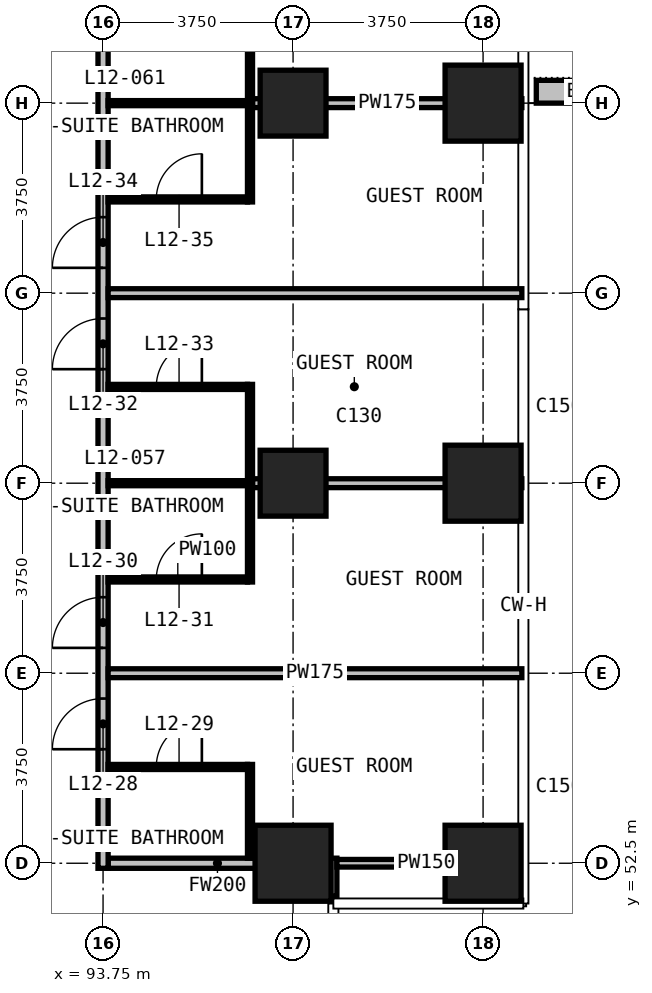
"""IFC4 building model, lengths in metres.
Left out: names, types, materials, properties, quantities, classifications, styles, units other than length and angle.
Written with IfcOpenShell. Run it as: python <this file> out.ifc"""

import sys

from ifc_helpers import new_model, si_unit, direction, frame, frame_2d, origin, origin_2d, place, context, subcontext, project, spatial, rectangle, extrude, element, fill, save


model = new_model("IFC4")
c1 = context("Model", 3, precision=1e-05, world=origin(), true_north=direction((0.0, 1.0)))
c2 = subcontext(c1, "Body", "Model", "MODEL_VIEW")
j1 = project(units=[si_unit("LENGTHUNIT", "METRE"), si_unit("PLANEANGLEUNIT", "RADIAN")], contexts=[c1])
p1 = place(None, origin())
s1 = spatial("IfcSite", under=j1, at=p1, CompositionType="ELEMENT")
p2 = place(p1, origin())
s2 = spatial("IfcBuilding", under=s1, at=p2, CompositionType="ELEMENT")
p3 = place(p2, frame((0.0, 0.0, 59.3)))
s3 = spatial("IfcBuildingStorey", under=s2, at=p3, CompositionType="ELEMENT", Elevation=59.3)
p4 = place(p3, frame((97.5, 52.5, 0.0), z_axis=(0.0, 0.0, 1.0), x_axis=(1.0, 0.0, 0.0)))
e1 = element("IfcColumn", 1, at=p4, inside=s3, PredefinedType="COLUMN", context=c2, shape_type="SweptSolid", body=[
    extrude(rectangle(XDim=1.5, YDim=1.5, at=origin_2d()), origin(), (0.0, 0.0, 1.0), 3.3),
])
for number, where, z_axis, x_axis in (
    (2, (97.5, 60.0, 0.0), (0.0, 0.0, 1.0), (1.0, 0.0, 0.0)),
    (3, (97.5, 67.5, 0.0), (0.0, 0.0, 1.0), (1.0, 0.0, 0.0)),
):
    element("IfcColumn", number, at=place(p3, frame(where, z_axis=z_axis, x_axis=x_axis)), inside=s3, PredefinedType="COLUMN", context=c2, shape_type="SweptSolid", body=[
        extrude(rectangle(XDim=1.3, YDim=1.3, at=origin_2d()), origin(), (0.0, 0.0, 1.0), 3.3),
    ])
for number, where, z_axis, x_axis in (
    (4, (101.25, 52.5, 0.0), (0.0, 0.0, 1.0), (1.0, 0.0, 0.0)),
    (5, (101.25, 60.0, 0.0), (0.0, 0.0, 1.0), (1.0, 0.0, 0.0)),
    (6, (101.25, 67.5, 0.0), (0.0, 0.0, 1.0), (1.0, 0.0, 0.0)),
):
    element("IfcColumn", number, at=place(p3, frame(where, z_axis=z_axis, x_axis=x_axis)), inside=s3, PredefinedType="COLUMN", context=c2, shape_type="SweptSolid", body=[
        extrude(rectangle(XDim=1.5, YDim=1.5, at=origin_2d()), origin(), (0.0, 0.0, 1.0), 3.3),
    ])
p5 = place(p3, frame((102.3, 67.725, 0.0), z_axis=(0.0, 0.0, 1.0), x_axis=(1.0, 0.0, 0.0)))
e7 = element("IfcWall", 7, at=p5, inside=s3, PredefinedType="USERDEFINED", context=c2, shape_type="SweptSolid", body=[
    extrude(rectangle(XDim=2.35, YDim=0.45, at=frame_2d((1.175, 0.0))), origin(), (0.0, 0.0, 1.0), 1.1),
])
p6 = place(p3, frame((93.85, 52.5, 0.0), z_axis=(0.0, 0.0, 1.0), x_axis=(1.0, 0.0, 0.0)))
e8 = element("IfcWall", 8, at=p6, inside=s3, PredefinedType="PARTITIONING", context=c2, shape_type="SweptSolid", body=[
    extrude(rectangle(XDim=4.315, YDim=0.2, at=frame_2d((2.157, 0.0))), origin(), (0.0, 0.0, 1.0), 3.0),
])
p7 = place(p3, frame((93.75, 52.4, 0.0), z_axis=(0.0, 0.0, 1.0), x_axis=(0.0, 1.0, 0.0)))
e9 = element("IfcWall", 9, at=p7, inside=s3, PredefinedType="PARTITIONING", context=c2, shape_type="SweptSolid", body=[
    extrude(rectangle(XDim=33.925, YDim=0.2, at=frame_2d((16.962, 0.0))), origin(), (0.0, 0.0, 1.0), 3.0),
])
p8 = place(p7, frame((2.35, 0.0, 0.0)))
e10 = element("IfcOpeningElement", 10, at=p8, cuts=e9, PredefinedType="OPENING", context=c2, shape_type="SweptSolid", body=[
    extrude(rectangle(XDim=1.0, YDim=2.2, at=frame_2d((0.5, 1.1))), frame((0.0, 0.11, 0.0), z_axis=(0.0, -1.0, 0.0), x_axis=(1.0, 0.0, 0.0)), (0.0, 0.0, 1.0), 0.22),
])
p9 = place(p7, frame((4.35, 0.0, 0.0)))
e11 = element("IfcOpeningElement", 11, at=p9, cuts=e9, PredefinedType="OPENING", context=c2, shape_type="SweptSolid", body=[
    extrude(rectangle(XDim=1.0, YDim=2.2, at=frame_2d((0.5, 1.1))), frame((0.0, 0.11, 0.0), z_axis=(0.0, -1.0, 0.0), x_axis=(1.0, 0.0, 0.0)), (0.0, 0.0, 1.0), 0.22),
])
p10 = place(p7, frame((9.85, 0.0, 0.0)))
e12 = element("IfcOpeningElement", 12, at=p10, cuts=e9, PredefinedType="OPENING", context=c2, shape_type="SweptSolid", body=[
    extrude(rectangle(XDim=1.0, YDim=2.2, at=frame_2d((0.5, 1.1))), frame((0.0, 0.11, 0.0), z_axis=(0.0, -1.0, 0.0), x_axis=(1.0, 0.0, 0.0)), (0.0, 0.0, 1.0), 0.22),
])
p11 = place(p7, frame((11.85, 0.0, 0.0)))
e13 = element("IfcOpeningElement", 13, at=p11, cuts=e9, PredefinedType="OPENING", context=c2, shape_type="SweptSolid", body=[
    extrude(rectangle(XDim=1.0, YDim=2.2, at=frame_2d((0.5, 1.1))), frame((0.0, 0.11, 0.0), z_axis=(0.0, -1.0, 0.0), x_axis=(1.0, 0.0, 0.0)), (0.0, 0.0, 1.0), 0.22),
])
p12 = place(p7, frame((17.35, 0.0, 0.0)))
e14 = element("IfcOpeningElement", 14, at=p12, cuts=e9, PredefinedType="OPENING", context=c2, shape_type="SweptSolid", body=[
    extrude(rectangle(XDim=1.0, YDim=2.2, at=frame_2d((0.5, 1.1))), frame((0.0, 0.11, 0.0), z_axis=(0.0, -1.0, 0.0), x_axis=(1.0, 0.0, 0.0)), (0.0, 0.0, 1.0), 0.22),
])
p13 = place(p7, frame((19.35, 0.0, 0.0)))
e15 = element("IfcOpeningElement", 15, at=p13, cuts=e9, PredefinedType="OPENING", context=c2, shape_type="SweptSolid", body=[
    extrude(rectangle(XDim=1.0, YDim=2.2, at=frame_2d((0.5, 1.1))), frame((0.0, 0.11, 0.0), z_axis=(0.0, -1.0, 0.0), x_axis=(1.0, 0.0, 0.0)), (0.0, 0.0, 1.0), 0.22),
])
p14 = place(p7, frame((24.85, 0.0, 0.0)))
e16 = element("IfcOpeningElement", 16, at=p14, cuts=e9, PredefinedType="OPENING", context=c2, shape_type="SweptSolid", body=[
    extrude(rectangle(XDim=1.0, YDim=2.2, at=frame_2d((0.5, 1.1))), frame((0.0, 0.11, 0.0), z_axis=(0.0, -1.0, 0.0), x_axis=(1.0, 0.0, 0.0)), (0.0, 0.0, 1.0), 0.22),
])
p15 = place(p7, frame((26.85, 0.0, 0.0)))
e17 = element("IfcOpeningElement", 17, at=p15, cuts=e9, PredefinedType="OPENING", context=c2, shape_type="SweptSolid", body=[
    extrude(rectangle(XDim=1.0, YDim=2.2, at=frame_2d((0.5, 1.1))), frame((0.0, 0.11, 0.0), z_axis=(0.0, -1.0, 0.0), x_axis=(1.0, 0.0, 0.0)), (0.0, 0.0, 1.0), 0.22),
])
p16 = place(p7, frame((31.55, 0.0, 0.0)))
e18 = element("IfcOpeningElement", 18, at=p16, cuts=e9, PredefinedType="OPENING", context=c2, shape_type="SweptSolid", body=[
    extrude(rectangle(XDim=0.9, YDim=2.2, at=frame_2d((0.45, 1.1))), frame((0.0, 0.11, 0.0), z_axis=(0.0, -1.0, 0.0), x_axis=(1.0, 0.0, 0.0)), (0.0, 0.0, 1.0), 0.22),
])
p17 = place(p3, frame((98.265, 51.855, 0.0), z_axis=(0.0, 0.0, 1.0), x_axis=(0.0, 1.0, 0.0)))
e19 = element("IfcWall", 19, at=p17, inside=s3, PredefinedType="PARTITIONING", context=c2, shape_type="SweptSolid", body=[
    extrude(rectangle(XDim=0.745, YDim=0.2, at=frame_2d((0.373, 0.0))), origin(), (0.0, 0.0, 1.0), 3.0),
])
p18 = place(p3, frame((93.85, 56.25, 0.0), z_axis=(0.0, 0.0, 1.0), x_axis=(1.0, 0.0, 0.0)))
e20 = element("IfcWall", 20, at=p18, inside=s3, PredefinedType="PARTITIONING", context=c2, shape_type="SweptSolid", body=[
    extrude(rectangle(XDim=8.165, YDim=0.175, at=frame_2d((4.083, 0.0))), origin(), (0.0, 0.0, 1.0), 3.0),
])
p19 = place(p3, frame((96.7, 60.0, 0.0), z_axis=(0.0, 0.0, 1.0), x_axis=(1.0, 0.0, 0.0)))
e21 = element("IfcWall", 21, at=p19, inside=s3, PredefinedType="PARTITIONING", context=c2, shape_type="SweptSolid", body=[
    extrude(rectangle(XDim=5.315, YDim=0.175, at=frame_2d((2.657, 0.0))), origin(), (0.0, 0.0, 1.0), 3.0),
])
p20 = place(p3, frame((93.85, 63.75, 0.0), z_axis=(0.0, 0.0, 1.0), x_axis=(1.0, 0.0, 0.0)))
e22 = element("IfcWall", 22, at=p20, inside=s3, PredefinedType="PARTITIONING", context=c2, shape_type="SweptSolid", body=[
    extrude(rectangle(XDim=8.165, YDim=0.175, at=frame_2d((4.083, 0.0))), origin(), (0.0, 0.0, 1.0), 3.0),
])
p21 = place(p3, frame((96.7, 67.5, 0.0), z_axis=(0.0, 0.0, 1.0), x_axis=(1.0, 0.0, 0.0)))
e23 = element("IfcWall", 23, at=p21, inside=s3, PredefinedType="PARTITIONING", context=c2, shape_type="SweptSolid", body=[
    extrude(rectangle(XDim=5.315, YDim=0.175, at=frame_2d((2.657, 0.0))), origin(), (0.0, 0.0, 1.0), 3.0),
])
p22 = place(p3, frame((98.365, 52.5, 0.0), z_axis=(0.0, 0.0, 1.0), x_axis=(1.0, 0.0, 0.0)))
e24 = element("IfcWall", 24, at=p22, inside=s3, PredefinedType="PARTITIONING", context=c2, shape_type="SweptSolid", body=[
    extrude(rectangle(XDim=3.53, YDim=0.15, at=frame_2d((1.765, 0.0))), origin(), (0.0, 0.0, 1.0), 3.0),
])
p23 = place(p3, frame((93.85, 54.4, 0.0), z_axis=(0.0, 0.0, 1.0), x_axis=(1.0, 0.0, 0.0)))
e25 = element("IfcWall", 25, at=p23, inside=s3, PredefinedType="PARTITIONING", context=c2, shape_type="SweptSolid", body=[
    extrude(rectangle(XDim=2.75, YDim=0.1, at=frame_2d((1.375, 0.0))), origin(), (0.0, 0.0, 1.0), 3.0),
])
p24 = place(p23, frame((0.95, 0.0, 0.0)))
e26 = element("IfcOpeningElement", 26, at=p24, cuts=e25, PredefinedType="OPENING", context=c2, shape_type="SweptSolid", body=[
    extrude(rectangle(XDim=0.9, YDim=2.2, at=frame_2d((0.45, 1.1))), frame((0.0, 0.06, 0.0), z_axis=(0.0, -1.0, 0.0), x_axis=(1.0, 0.0, 0.0)), (0.0, 0.0, 1.0), 0.12),
])
p25 = place(p3, frame((93.85, 58.1, 0.0), z_axis=(0.0, 0.0, 1.0), x_axis=(1.0, 0.0, 0.0)))
e27 = element("IfcWall", 27, at=p25, inside=s3, PredefinedType="PARTITIONING", context=c2, shape_type="SweptSolid", body=[
    extrude(rectangle(XDim=2.75, YDim=0.1, at=frame_2d((1.375, 0.0))), origin(), (0.0, 0.0, 1.0), 3.0),
])
p26 = place(p25, frame((0.95, 0.0, 0.0)))
e28 = element("IfcOpeningElement", 28, at=p26, cuts=e27, PredefinedType="OPENING", context=c2, shape_type="SweptSolid", body=[
    extrude(rectangle(XDim=0.9, YDim=2.2, at=frame_2d((0.45, 1.1))), frame((0.0, 0.06, 0.0), z_axis=(0.0, -1.0, 0.0), x_axis=(1.0, 0.0, 0.0)), (0.0, 0.0, 1.0), 0.12),
])
p27 = place(p3, frame((93.85, 60.0, 0.0), z_axis=(0.0, 0.0, 1.0), x_axis=(1.0, 0.0, 0.0)))
e29 = element("IfcWall", 29, at=p27, inside=s3, PredefinedType="PARTITIONING", context=c2, shape_type="SweptSolid", body=[
    extrude(rectangle(XDim=2.75, YDim=0.1, at=frame_2d((1.375, 0.0))), origin(), (0.0, 0.0, 1.0), 3.0),
])
p28 = place(p3, frame((93.85, 61.9, 0.0), z_axis=(0.0, 0.0, 1.0), x_axis=(1.0, 0.0, 0.0)))
e30 = element("IfcWall", 30, at=p28, inside=s3, PredefinedType="PARTITIONING", context=c2, shape_type="SweptSolid", body=[
    extrude(rectangle(XDim=2.75, YDim=0.1, at=frame_2d((1.375, 0.0))), origin(), (0.0, 0.0, 1.0), 3.0),
])
p29 = place(p28, frame((0.95, 0.0, 0.0)))
e31 = element("IfcOpeningElement", 31, at=p29, cuts=e30, PredefinedType="OPENING", context=c2, shape_type="SweptSolid", body=[
    extrude(rectangle(XDim=0.9, YDim=2.2, at=frame_2d((0.45, 1.1))), frame((0.0, 0.06, 0.0), z_axis=(0.0, -1.0, 0.0), x_axis=(1.0, 0.0, 0.0)), (0.0, 0.0, 1.0), 0.12),
])
p30 = place(p3, frame((93.85, 65.6, 0.0), z_axis=(0.0, 0.0, 1.0), x_axis=(1.0, 0.0, 0.0)))
e32 = element("IfcWall", 32, at=p30, inside=s3, PredefinedType="PARTITIONING", context=c2, shape_type="SweptSolid", body=[
    extrude(rectangle(XDim=2.75, YDim=0.1, at=frame_2d((1.375, 0.0))), origin(), (0.0, 0.0, 1.0), 3.0),
])
p31 = place(p30, frame((0.95, 0.0, 0.0)))
e33 = element("IfcOpeningElement", 33, at=p31, cuts=e32, PredefinedType="OPENING", context=c2, shape_type="SweptSolid", body=[
    extrude(rectangle(XDim=0.9, YDim=2.2, at=frame_2d((0.45, 1.1))), frame((0.0, 0.06, 0.0), z_axis=(0.0, -1.0, 0.0), x_axis=(1.0, 0.0, 0.0)), (0.0, 0.0, 1.0), 0.12),
])
p32 = place(p3, frame((93.85, 67.5, 0.0), z_axis=(0.0, 0.0, 1.0), x_axis=(1.0, 0.0, 0.0)))
e34 = element("IfcWall", 34, at=p32, inside=s3, PredefinedType="PARTITIONING", context=c2, shape_type="SweptSolid", body=[
    extrude(rectangle(XDim=2.75, YDim=0.1, at=frame_2d((1.375, 0.0))), origin(), (0.0, 0.0, 1.0), 3.0),
])
p33 = place(p3, frame((96.65, 52.6, 0.0), z_axis=(0.0, 0.0, 1.0), x_axis=(0.0, 1.0, 0.0)))
e35 = element("IfcWall", 35, at=p33, inside=s3, PredefinedType="PARTITIONING", context=c2, shape_type="SweptSolid", body=[
    extrude(rectangle(XDim=1.85, YDim=0.1, at=frame_2d((0.925, 0.0))), origin(), (0.0, 0.0, 1.0), 3.0),
])
for number, where, z_axis, x_axis in (
    (36, (96.65, 58.05, 0.0), (0.0, 0.0, 1.0), (0.0, 1.0, 0.0)),
    (37, (96.65, 65.55, 0.0), (0.0, 0.0, 1.0), (0.0, 1.0, 0.0)),
):
    element("IfcWall", number, at=place(p3, frame(where, z_axis=z_axis, x_axis=x_axis)), inside=s3, PredefinedType="PARTITIONING", context=c2, shape_type="SweptSolid", body=[
        extrude(rectangle(XDim=3.9, YDim=0.1, at=frame_2d((1.95, 0.0))), origin(), (0.0, 0.0, 1.0), 3.0),
    ])
p34 = place(p8, origin())
e38 = element("IfcDoor", 38, at=p34, inside=s3, OperationType="SINGLE_SWING_RIGHT", PredefinedType="DOOR", context=c2, shape_type="SweptSolid", body=[
    extrude(rectangle(XDim=1.0, YDim=2.2, at=frame_2d((0.5, 1.1))), frame((0.0, 0.025, 0.0), z_axis=(0.0, -1.0, 0.0), x_axis=(1.0, 0.0, 0.0)), (0.0, 0.0, 1.0), 0.05),
])
fill(e10, e38)
p35 = place(p24, origin())
e39 = element("IfcDoor", 39, at=p35, inside=s3, OperationType="SINGLE_SWING_RIGHT", PredefinedType="DOOR", context=c2, shape_type="SweptSolid", body=[
    extrude(rectangle(XDim=0.9, YDim=2.2, at=frame_2d((0.45, 1.1))), frame((0.0, 0.025, 0.0), z_axis=(0.0, -1.0, 0.0), x_axis=(1.0, 0.0, 0.0)), (0.0, 0.0, 1.0), 0.05),
])
fill(e26, e39)
p36 = place(p9, origin())
e40 = element("IfcDoor", 40, at=p36, inside=s3, OperationType="SINGLE_SWING_RIGHT", PredefinedType="DOOR", context=c2, shape_type="SweptSolid", body=[
    extrude(rectangle(XDim=1.0, YDim=2.2, at=frame_2d((0.5, 1.1))), frame((0.0, 0.025, 0.0), z_axis=(0.0, -1.0, 0.0), x_axis=(1.0, 0.0, 0.0)), (0.0, 0.0, 1.0), 0.05),
])
fill(e11, e40)
p37 = place(p26, origin())
e41 = element("IfcDoor", 41, at=p37, inside=s3, OperationType="SINGLE_SWING_RIGHT", PredefinedType="DOOR", context=c2, shape_type="SweptSolid", body=[
    extrude(rectangle(XDim=0.9, YDim=2.2, at=frame_2d((0.45, 1.1))), frame((0.0, 0.025, 0.0), z_axis=(0.0, -1.0, 0.0), x_axis=(1.0, 0.0, 0.0)), (0.0, 0.0, 1.0), 0.05),
])
fill(e28, e41)
p38 = place(p10, origin())
e42 = element("IfcDoor", 42, at=p38, inside=s3, OperationType="SINGLE_SWING_LEFT", PredefinedType="DOOR", context=c2, shape_type="SweptSolid", body=[
    extrude(rectangle(XDim=1.0, YDim=2.2, at=frame_2d((0.5, 1.1))), frame((0.0, 0.025, 0.0), z_axis=(0.0, -1.0, 0.0), x_axis=(1.0, 0.0, 0.0)), (0.0, 0.0, 1.0), 0.05),
])
fill(e12, e42)
p39 = place(p29, origin())
e43 = element("IfcDoor", 43, at=p39, inside=s3, OperationType="SINGLE_SWING_RIGHT", PredefinedType="DOOR", context=c2, shape_type="SweptSolid", body=[
    extrude(rectangle(XDim=0.9, YDim=2.2, at=frame_2d((0.45, 1.1))), frame((0.0, 0.025, 0.0), z_axis=(0.0, -1.0, 0.0), x_axis=(1.0, 0.0, 0.0)), (0.0, 0.0, 1.0), 0.05),
])
fill(e31, e43)
p40 = place(p11, origin())
e44 = element("IfcDoor", 44, at=p40, inside=s3, OperationType="SINGLE_SWING_LEFT", PredefinedType="DOOR", context=c2, shape_type="SweptSolid", body=[
    extrude(rectangle(XDim=1.0, YDim=2.2, at=frame_2d((0.5, 1.1))), frame((0.0, 0.025, 0.0), z_axis=(0.0, -1.0, 0.0), x_axis=(1.0, 0.0, 0.0)), (0.0, 0.0, 1.0), 0.05),
])
fill(e13, e44)
p41 = place(p31, origin())
e45 = element("IfcDoor", 45, at=p41, inside=s3, OperationType="SINGLE_SWING_RIGHT", PredefinedType="DOOR", context=c2, shape_type="SweptSolid", body=[
    extrude(rectangle(XDim=0.9, YDim=2.2, at=frame_2d((0.45, 1.1))), frame((0.0, 0.025, 0.0), z_axis=(0.0, -1.0, 0.0), x_axis=(1.0, 0.0, 0.0)), (0.0, 0.0, 1.0), 0.05),
])
fill(e33, e45)
save(model, sys.argv[1])
